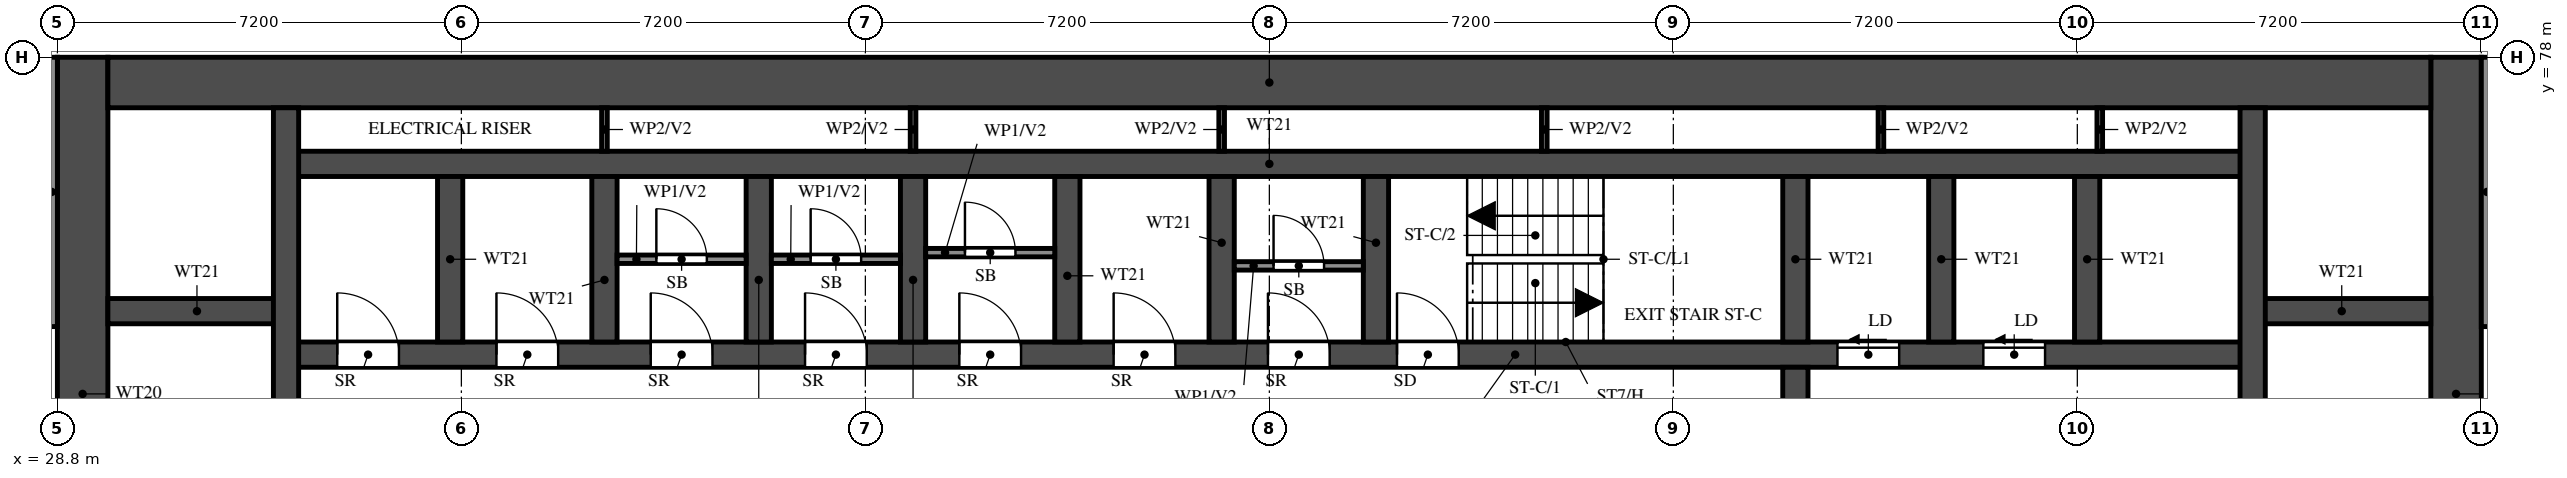
"""IFC4 building model, lengths in metres.
Left out: names, types, materials, properties, quantities, classifications, styles, units other than length and angle.
Written with IfcOpenShell. Run it as: python <this file> out.ifc"""

import sys

from ifc_helpers import new_model, si_unit, direction, frame, frame_2d, origin, place, context, subcontext, project, spatial, rectangle, extrude, element, fill, save


model = new_model("IFC4")
c1 = context("Model", 3, precision=1e-05, world=origin(), true_north=direction((0.0, 1.0)))
c2 = subcontext(c1, "Body", "Model", "MODEL_VIEW")
j1 = project(units=[si_unit("LENGTHUNIT", "METRE"), si_unit("PLANEANGLEUNIT", "RADIAN")], contexts=[c1])
p1 = place(None, origin())
s1 = spatial("IfcSite", under=j1, at=p1, CompositionType="ELEMENT")
p2 = place(p1, origin())
s2 = spatial("IfcBuilding", under=s1, at=p2, CompositionType="ELEMENT")
p3 = place(p2, frame((0.0, 0.0, 100.5)))
s3 = spatial("IfcBuildingStorey", under=s2, at=p3, CompositionType="ELEMENT", Elevation=100.5)
for number, where, z_axis, x_axis in (
    (1, (29.25, 66.0, 0.0), (0.0, 0.0, 1.0), (0.0, 1.0, 0.0)),
    (2, (71.55, 66.0, 0.0), (0.0, 0.0, 1.0), (0.0, 1.0, 0.0)),
):
    element("IfcWall", number, at=place(p3, frame(where, z_axis=z_axis, x_axis=x_axis)), inside=s3, PredefinedType="SHEAR", context=c2, shape_type="SweptSolid", body=[
        extrude(rectangle(XDim=12.0, YDim=0.9, at=frame_2d((6.0, 0.0))), origin(), (0.0, 0.0, 1.0), 3.18),
    ])
p4 = place(p3, frame((29.7, 77.55, 0.0), z_axis=(0.0, 0.0, 1.0), x_axis=(1.0, 0.0, 0.0)))
e3 = element("IfcWall", 3, at=p4, inside=s3, PredefinedType="SHEAR", context=c2, shape_type="SweptSolid", body=[
    extrude(rectangle(XDim=41.4, YDim=0.9, at=frame_2d((20.7, 0.0))), origin(), (0.0, 0.0, 1.0), 3.18),
])
p5 = place(p3, frame((32.875, 72.7, 0.0), z_axis=(0.0, 0.0, 1.0), x_axis=(1.0, 0.0, 0.0)))
e4 = element("IfcWall", 4, at=p5, inside=s3, PredefinedType="SHEAR", context=c2, shape_type="SweptSolid", body=[
    extrude(rectangle(XDim=35.05, YDim=0.45, at=frame_2d((17.525, 0.0))), origin(), (0.0, 0.0, 1.0), 3.18),
])
p6 = place(p5, frame((19.8, 0.0, 0.0)))
e5 = element("IfcOpeningElement", 5, at=p6, cuts=e4, PredefinedType="OPENING", context=c2, shape_type="SweptSolid", body=[
    extrude(rectangle(XDim=1.1, YDim=2.1, at=frame_2d((0.55, 1.05))), frame((0.0, 0.235, 0.0), z_axis=(0.0, -1.0, 0.0), x_axis=(1.0, 0.0, 0.0)), (0.0, 0.0, 1.0), 0.47),
])
p7 = place(p5, frame((27.65, 0.0, 0.0)))
e6 = element("IfcOpeningElement", 6, at=p7, cuts=e4, PredefinedType="OPENING", context=c2, shape_type="SweptSolid", body=[
    extrude(rectangle(XDim=1.1, YDim=2.1, at=frame_2d((0.55, 1.05))), frame((0.0, 0.235, 0.0), z_axis=(0.0, -1.0, 0.0), x_axis=(1.0, 0.0, 0.0)), (0.0, 0.0, 1.0), 0.47),
])
p8 = place(p5, frame((30.25, 0.0, 0.0)))
e7 = element("IfcOpeningElement", 7, at=p8, cuts=e4, PredefinedType="OPENING", context=c2, shape_type="SweptSolid", body=[
    extrude(rectangle(XDim=1.1, YDim=2.1, at=frame_2d((0.55, 1.05))), frame((0.0, 0.235, 0.0), z_axis=(0.0, -1.0, 0.0), x_axis=(1.0, 0.0, 0.0)), (0.0, 0.0, 1.0), 0.47),
])
p9 = place(p5, frame((3.75, 0.0, 0.0)))
e8 = element("IfcOpeningElement", 8, at=p9, cuts=e4, PredefinedType="OPENING", context=c2, shape_type="SweptSolid", body=[
    extrude(rectangle(XDim=1.1, YDim=2.1, at=frame_2d((0.55, 1.05))), frame((0.0, 0.235, 0.0), z_axis=(0.0, -1.0, 0.0), x_axis=(1.0, 0.0, 0.0)), (0.0, 0.0, 1.0), 0.47),
])
p10 = place(p5, frame((6.5, 0.0, 0.0)))
e9 = element("IfcOpeningElement", 9, at=p10, cuts=e4, PredefinedType="OPENING", context=c2, shape_type="SweptSolid", body=[
    extrude(rectangle(XDim=1.1, YDim=2.1, at=frame_2d((0.55, 1.05))), frame((0.0, 0.235, 0.0), z_axis=(0.0, -1.0, 0.0), x_axis=(1.0, 0.0, 0.0)), (0.0, 0.0, 1.0), 0.47),
])
p11 = place(p5, frame((9.25, 0.0, 0.0)))
e10 = element("IfcOpeningElement", 10, at=p11, cuts=e4, PredefinedType="OPENING", context=c2, shape_type="SweptSolid", body=[
    extrude(rectangle(XDim=1.1, YDim=2.1, at=frame_2d((0.55, 1.05))), frame((0.0, 0.235, 0.0), z_axis=(0.0, -1.0, 0.0), x_axis=(1.0, 0.0, 0.0)), (0.0, 0.0, 1.0), 0.47),
])
p12 = place(p5, frame((12.0, 0.0, 0.0)))
e11 = element("IfcOpeningElement", 11, at=p12, cuts=e4, PredefinedType="OPENING", context=c2, shape_type="SweptSolid", body=[
    extrude(rectangle(XDim=1.1, YDim=2.1, at=frame_2d((0.55, 1.05))), frame((0.0, 0.235, 0.0), z_axis=(0.0, -1.0, 0.0), x_axis=(1.0, 0.0, 0.0)), (0.0, 0.0, 1.0), 0.47),
])
p13 = place(p5, frame((14.75, 0.0, 0.0)))
e12 = element("IfcOpeningElement", 12, at=p13, cuts=e4, PredefinedType="OPENING", context=c2, shape_type="SweptSolid", body=[
    extrude(rectangle(XDim=1.1, YDim=2.1, at=frame_2d((0.55, 1.05))), frame((0.0, 0.235, 0.0), z_axis=(0.0, -1.0, 0.0), x_axis=(1.0, 0.0, 0.0)), (0.0, 0.0, 1.0), 0.47),
])
p14 = place(p5, frame((17.5, 0.0, 0.0)))
e13 = element("IfcOpeningElement", 13, at=p14, cuts=e4, PredefinedType="OPENING", context=c2, shape_type="SweptSolid", body=[
    extrude(rectangle(XDim=1.1, YDim=2.1, at=frame_2d((0.55, 1.05))), frame((0.0, 0.235, 0.0), z_axis=(0.0, -1.0, 0.0), x_axis=(1.0, 0.0, 0.0)), (0.0, 0.0, 1.0), 0.47),
])
p15 = place(p5, frame((0.913, 0.0, 0.0)))
e14 = element("IfcOpeningElement", 14, at=p15, cuts=e4, PredefinedType="OPENING", context=c2, shape_type="SweptSolid", body=[
    extrude(rectangle(XDim=1.1, YDim=2.1, at=frame_2d((0.55, 1.05))), frame((0.0, 0.235, 0.0), z_axis=(0.0, -1.0, 0.0), x_axis=(1.0, 0.0, 0.0)), (0.0, 0.0, 1.0), 0.47),
])
p16 = place(p3, frame((32.875, 76.1, 0.0), z_axis=(0.0, 0.0, 1.0), x_axis=(1.0, 0.0, 0.0)))
e15 = element("IfcWall", 15, at=p16, inside=s3, PredefinedType="SHEAR", context=c2, shape_type="SweptSolid", body=[
    extrude(rectangle(XDim=35.05, YDim=0.45, at=frame_2d((17.525, 0.0))), origin(), (0.0, 0.0, 1.0), 3.18),
])
for number, where, z_axis, x_axis in (
    (16, (29.7, 73.475, 0.0), (0.0, 0.0, 1.0), (1.0, 0.0, 0.0)),
    (17, (67.925, 73.475, 0.0), (0.0, 0.0, 1.0), (1.0, 0.0, 0.0)),
):
    element("IfcWall", number, at=place(p3, frame(where, z_axis=z_axis, x_axis=x_axis)), inside=s3, PredefinedType="SHEAR", context=c2, shape_type="SweptSolid", body=[
        extrude(rectangle(XDim=3.175, YDim=0.45, at=frame_2d((1.587, 0.0))), origin(), (0.0, 0.0, 1.0), 3.18),
    ])
p17 = place(p3, frame((32.875, 66.45, 0.0), z_axis=(0.0, 0.0, 1.0), x_axis=(0.0, 1.0, 0.0)))
e18 = element("IfcWall", 18, at=p17, inside=s3, PredefinedType="SHEAR", context=c2, shape_type="SweptSolid", body=[
    extrude(rectangle(XDim=10.65, YDim=0.45, at=frame_2d((5.325, 0.0))), origin(), (0.0, 0.0, 1.0), 3.18),
])
p18 = place(p3, frame((67.925, 66.45, 0.0), z_axis=(0.0, 0.0, 1.0), x_axis=(0.0, 1.0, 0.0)))
e19 = element("IfcWall", 19, at=p18, inside=s3, PredefinedType="SHEAR", context=c2, shape_type="SweptSolid", body=[
    extrude(rectangle(XDim=10.65, YDim=0.45, at=frame_2d((5.325, 0.0))), origin(), (0.0, 0.0, 1.0), 3.18),
])
p19 = place(p18, frame((0.15, 0.0, 0.0)))
e20 = element("IfcOpeningElement", 20, at=p19, cuts=e19, PredefinedType="OPENING", context=c2, shape_type="SweptSolid", body=[
    extrude(rectangle(XDim=1.1, YDim=2.1, at=frame_2d((0.55, 1.05))), frame((0.0, 0.235, 0.0), z_axis=(0.0, -1.0, 0.0), x_axis=(1.0, 0.0, 0.0)), (0.0, 0.0, 1.0), 0.47),
])
p20 = place(p3, frame((59.775, 66.45, 0.0), z_axis=(0.0, 0.0, 1.0), x_axis=(0.0, 1.0, 0.0)))
e21 = element("IfcWall", 21, at=p20, inside=s3, PredefinedType="SHEAR", context=c2, shape_type="SweptSolid", body=[
    extrude(rectangle(XDim=6.025, YDim=0.45, at=frame_2d((3.013, 0.0))), origin(), (0.0, 0.0, 1.0), 3.18),
])
p21 = place(p20, frame((3.85, 0.0, 0.0)))
e22 = element("IfcOpeningElement", 22, at=p21, cuts=e21, PredefinedType="OPENING", context=c2, shape_type="SweptSolid", body=[
    extrude(rectangle(XDim=1.2, YDim=2.1, at=frame_2d((0.6, 1.05))), frame((0.0, 0.235, 0.0), z_axis=(0.0, -1.0, 0.0), x_axis=(1.0, 0.0, 0.0)), (0.0, 0.0, 1.0), 0.47),
])
for number, where, z_axis, x_axis in (
    (23, (59.775, 72.925, 0.0), (0.0, 0.0, 1.0), (0.0, 1.0, 0.0)),
    (24, (35.8, 72.925, 0.0), (0.0, 0.0, 1.0), (0.0, 1.0, 0.0)),
    (25, (38.55, 72.925, 0.0), (0.0, 0.0, 1.0), (0.0, 1.0, 0.0)),
    (26, (41.3, 72.925, 0.0), (0.0, 0.0, 1.0), (0.0, 1.0, 0.0)),
    (27, (44.05, 72.925, 0.0), (0.0, 0.0, 1.0), (0.0, 1.0, 0.0)),
    (28, (46.8, 72.925, 0.0), (0.0, 0.0, 1.0), (0.0, 1.0, 0.0)),
    (29, (49.55, 72.925, 0.0), (0.0, 0.0, 1.0), (0.0, 1.0, 0.0)),
    (30, (52.3, 72.925, 0.0), (0.0, 0.0, 1.0), (0.0, 1.0, 0.0)),
    (31, (62.375, 72.925, 0.0), (0.0, 0.0, 1.0), (0.0, 1.0, 0.0)),
    (32, (64.975, 72.925, 0.0), (0.0, 0.0, 1.0), (0.0, 1.0, 0.0)),
):
    element("IfcWall", number, at=place(p3, frame(where, z_axis=z_axis, x_axis=x_axis)), inside=s3, PredefinedType="SHEAR", context=c2, shape_type="SweptSolid", body=[
        extrude(rectangle(XDim=2.95, YDim=0.45, at=frame_2d((1.475, 0.0))), origin(), (0.0, 0.0, 1.0), 3.18),
    ])
p22 = place(p3, frame((38.775, 74.4, 0.0), z_axis=(0.0, 0.0, 1.0), x_axis=(1.0, 0.0, 0.0)))
e33 = element("IfcWall", 33, at=p22, inside=s3, PredefinedType="PARTITIONING", context=c2, shape_type="SweptSolid", body=[
    extrude(rectangle(XDim=2.3, YDim=0.15, at=frame_2d((1.15, 0.0))), origin(), (0.0, 0.0, 1.0), 3.18),
])
p23 = place(p22, frame((0.7, 0.0, 0.0)))
e34 = element("IfcOpeningElement", 34, at=p23, cuts=e33, PredefinedType="OPENING", context=c2, shape_type="SweptSolid", body=[
    extrude(rectangle(XDim=0.9, YDim=2.1, at=frame_2d((0.45, 1.05))), frame((0.0, 0.085, 0.0), z_axis=(0.0, -1.0, 0.0), x_axis=(1.0, 0.0, 0.0)), (0.0, 0.0, 1.0), 0.17),
])
p24 = place(p3, frame((41.525, 74.4, 0.0), z_axis=(0.0, 0.0, 1.0), x_axis=(1.0, 0.0, 0.0)))
e35 = element("IfcWall", 35, at=p24, inside=s3, PredefinedType="PARTITIONING", context=c2, shape_type="SweptSolid", body=[
    extrude(rectangle(XDim=2.3, YDim=0.15, at=frame_2d((1.15, 0.0))), origin(), (0.0, 0.0, 1.0), 3.18),
])
p25 = place(p24, frame((0.7, 0.0, 0.0)))
e36 = element("IfcOpeningElement", 36, at=p25, cuts=e35, PredefinedType="OPENING", context=c2, shape_type="SweptSolid", body=[
    extrude(rectangle(XDim=0.9, YDim=2.1, at=frame_2d((0.45, 1.05))), frame((0.0, 0.085, 0.0), z_axis=(0.0, -1.0, 0.0), x_axis=(1.0, 0.0, 0.0)), (0.0, 0.0, 1.0), 0.17),
])
p26 = place(p3, frame((44.275, 74.518, 0.0), z_axis=(0.0, 0.0, 1.0), x_axis=(1.0, 0.0, 0.0)))
e37 = element("IfcWall", 37, at=p26, inside=s3, PredefinedType="PARTITIONING", context=c2, shape_type="SweptSolid", body=[
    extrude(rectangle(XDim=2.3, YDim=0.15, at=frame_2d((1.15, 0.0))), origin(), (0.0, 0.0, 1.0), 3.18),
])
p27 = place(p26, frame((0.7, 0.0, 0.0)))
e38 = element("IfcOpeningElement", 38, at=p27, cuts=e37, PredefinedType="OPENING", context=c2, shape_type="SweptSolid", body=[
    extrude(rectangle(XDim=0.9, YDim=2.1, at=frame_2d((0.45, 1.05))), frame((0.0, 0.085, 0.0), z_axis=(0.0, -1.0, 0.0), x_axis=(1.0, 0.0, 0.0)), (0.0, 0.0, 1.0), 0.17),
])
p28 = place(p3, frame((49.775, 74.282, 0.0), z_axis=(0.0, 0.0, 1.0), x_axis=(1.0, 0.0, 0.0)))
e39 = element("IfcWall", 39, at=p28, inside=s3, PredefinedType="PARTITIONING", context=c2, shape_type="SweptSolid", body=[
    extrude(rectangle(XDim=2.3, YDim=0.15, at=frame_2d((1.15, 0.0))), origin(), (0.0, 0.0, 1.0), 3.18),
])
p29 = place(p28, frame((0.7, 0.0, 0.0)))
e40 = element("IfcOpeningElement", 40, at=p29, cuts=e39, PredefinedType="OPENING", context=c2, shape_type="SweptSolid", body=[
    extrude(rectangle(XDim=0.9, YDim=2.1, at=frame_2d((0.45, 1.05))), frame((0.0, 0.085, 0.0), z_axis=(0.0, -1.0, 0.0), x_axis=(1.0, 0.0, 0.0)), (0.0, 0.0, 1.0), 0.17),
])
for number, where, z_axis, x_axis in (
    (41, (38.55, 76.325, 0.0), (0.0, 0.0, 1.0), (0.0, 1.0, 0.0)),
    (42, (44.05, 76.325, 0.0), (0.0, 0.0, 1.0), (0.0, 1.0, 0.0)),
    (43, (49.55, 76.325, 0.0), (0.0, 0.0, 1.0), (0.0, 1.0, 0.0)),
    (44, (55.3, 76.325, 0.0), (0.0, 0.0, 1.0), (0.0, 1.0, 0.0)),
    (45, (61.3, 76.325, 0.0), (0.0, 0.0, 1.0), (0.0, 1.0, 0.0)),
    (46, (65.2, 76.325, 0.0), (0.0, 0.0, 1.0), (0.0, 1.0, 0.0)),
):
    element("IfcWall", number, at=place(p3, frame(where, z_axis=z_axis, x_axis=x_axis)), inside=s3, PredefinedType="PARTITIONING", context=c2, shape_type="SweptSolid", body=[
        extrude(rectangle(XDim=0.775, YDim=0.1, at=frame_2d((0.388, 0.0))), origin(), (0.0, 0.0, 1.0), 3.18),
    ])
for number, where, z_axis, x_axis in (
    (47, (28.7, 73.2, 0.0), (0.0, 0.0, 1.0), (0.0, 1.0, 0.0)),
    (48, (72.1, 73.2, 0.0), (0.0, 0.0, 1.0), (0.0, 1.0, 0.0)),
):
    element("IfcWall", number, at=place(p3, frame(where, z_axis=z_axis, x_axis=x_axis)), inside=s3, PredefinedType="SOLIDWALL", context=c2, shape_type="SweptSolid", body=[
        extrude(rectangle(XDim=4.8, YDim=0.2, at=frame_2d((2.4, 0.0))), origin(), (0.0, 0.0, 1.0), 3.18),
    ])
p30 = place(p6, origin())
e49 = element("IfcDoor", 49, at=p30, inside=s3, OperationType="SINGLE_SWING_LEFT", PredefinedType="DOOR", context=c2, shape_type="SweptSolid", body=[
    extrude(rectangle(XDim=1.1, YDim=2.1, at=frame_2d((0.55, 1.05))), frame((0.0, 0.025, 0.0), z_axis=(0.0, -1.0, 0.0), x_axis=(1.0, 0.0, 0.0)), (0.0, 0.0, 1.0), 0.05),
])
fill(e5, e49)
p31 = place(p7, origin())
e50 = element("IfcDoor", 50, at=p31, inside=s3, OperationType="SLIDING_TO_LEFT", PredefinedType="DOOR", context=c2, shape_type="SweptSolid", body=[
    extrude(rectangle(XDim=1.1, YDim=2.1, at=frame_2d((0.55, 1.05))), frame((0.0, 0.025, 0.0), z_axis=(0.0, -1.0, 0.0), x_axis=(1.0, 0.0, 0.0)), (0.0, 0.0, 1.0), 0.05),
])
fill(e6, e50)
p32 = place(p8, origin())
e51 = element("IfcDoor", 51, at=p32, inside=s3, OperationType="SLIDING_TO_LEFT", PredefinedType="DOOR", context=c2, shape_type="SweptSolid", body=[
    extrude(rectangle(XDim=1.1, YDim=2.1, at=frame_2d((0.55, 1.05))), frame((0.0, 0.025, 0.0), z_axis=(0.0, -1.0, 0.0), x_axis=(1.0, 0.0, 0.0)), (0.0, 0.0, 1.0), 0.05),
])
fill(e7, e51)
p33 = place(p9, origin())
e52 = element("IfcDoor", 52, at=p33, inside=s3, OperationType="SINGLE_SWING_LEFT", PredefinedType="DOOR", context=c2, shape_type="SweptSolid", body=[
    extrude(rectangle(XDim=1.1, YDim=2.1, at=frame_2d((0.55, 1.05))), frame((0.0, 0.025, 0.0), z_axis=(0.0, -1.0, 0.0), x_axis=(1.0, 0.0, 0.0)), (0.0, 0.0, 1.0), 0.05),
])
fill(e8, e52)
p34 = place(p10, origin())
e53 = element("IfcDoor", 53, at=p34, inside=s3, OperationType="SINGLE_SWING_LEFT", PredefinedType="DOOR", context=c2, shape_type="SweptSolid", body=[
    extrude(rectangle(XDim=1.1, YDim=2.1, at=frame_2d((0.55, 1.05))), frame((0.0, 0.025, 0.0), z_axis=(0.0, -1.0, 0.0), x_axis=(1.0, 0.0, 0.0)), (0.0, 0.0, 1.0), 0.05),
])
fill(e9, e53)
p35 = place(p23, origin())
e54 = element("IfcDoor", 54, at=p35, inside=s3, OperationType="SINGLE_SWING_RIGHT", PredefinedType="DOOR", context=c2, shape_type="SweptSolid", body=[
    extrude(rectangle(XDim=0.9, YDim=2.1, at=frame_2d((0.45, 1.05))), frame((0.0, 0.025, 0.0), z_axis=(0.0, -1.0, 0.0), x_axis=(1.0, 0.0, 0.0)), (0.0, 0.0, 1.0), 0.05),
])
fill(e34, e54)
p36 = place(p11, origin())
e55 = element("IfcDoor", 55, at=p36, inside=s3, OperationType="SINGLE_SWING_LEFT", PredefinedType="DOOR", context=c2, shape_type="SweptSolid", body=[
    extrude(rectangle(XDim=1.1, YDim=2.1, at=frame_2d((0.55, 1.05))), frame((0.0, 0.025, 0.0), z_axis=(0.0, -1.0, 0.0), x_axis=(1.0, 0.0, 0.0)), (0.0, 0.0, 1.0), 0.05),
])
fill(e10, e55)
p37 = place(p25, origin())
e56 = element("IfcDoor", 56, at=p37, inside=s3, OperationType="SINGLE_SWING_LEFT", PredefinedType="DOOR", context=c2, shape_type="SweptSolid", body=[
    extrude(rectangle(XDim=0.9, YDim=2.1, at=frame_2d((0.45, 1.05))), frame((0.0, 0.025, 0.0), z_axis=(0.0, -1.0, 0.0), x_axis=(1.0, 0.0, 0.0)), (0.0, 0.0, 1.0), 0.05),
])
fill(e36, e56)
p38 = place(p12, origin())
e57 = element("IfcDoor", 57, at=p38, inside=s3, OperationType="SINGLE_SWING_LEFT", PredefinedType="DOOR", context=c2, shape_type="SweptSolid", body=[
    extrude(rectangle(XDim=1.1, YDim=2.1, at=frame_2d((0.55, 1.05))), frame((0.0, 0.025, 0.0), z_axis=(0.0, -1.0, 0.0), x_axis=(1.0, 0.0, 0.0)), (0.0, 0.0, 1.0), 0.05),
])
fill(e11, e57)
p39 = place(p27, origin())
e58 = element("IfcDoor", 58, at=p39, inside=s3, OperationType="SINGLE_SWING_LEFT", PredefinedType="DOOR", context=c2, shape_type="SweptSolid", body=[
    extrude(rectangle(XDim=0.9, YDim=2.1, at=frame_2d((0.45, 1.05))), frame((0.0, 0.025, 0.0), z_axis=(0.0, -1.0, 0.0), x_axis=(1.0, 0.0, 0.0)), (0.0, 0.0, 1.0), 0.05),
])
fill(e38, e58)
p40 = place(p13, origin())
e59 = element("IfcDoor", 59, at=p40, inside=s3, OperationType="SINGLE_SWING_LEFT", PredefinedType="DOOR", context=c2, shape_type="SweptSolid", body=[
    extrude(rectangle(XDim=1.1, YDim=2.1, at=frame_2d((0.55, 1.05))), frame((0.0, 0.025, 0.0), z_axis=(0.0, -1.0, 0.0), x_axis=(1.0, 0.0, 0.0)), (0.0, 0.0, 1.0), 0.05),
])
fill(e12, e59)
p41 = place(p14, origin())
e60 = element("IfcDoor", 60, at=p41, inside=s3, OperationType="SINGLE_SWING_LEFT", PredefinedType="DOOR", context=c2, shape_type="SweptSolid", body=[
    extrude(rectangle(XDim=1.1, YDim=2.1, at=frame_2d((0.55, 1.05))), frame((0.0, 0.025, 0.0), z_axis=(0.0, -1.0, 0.0), x_axis=(1.0, 0.0, 0.0)), (0.0, 0.0, 1.0), 0.05),
])
fill(e13, e60)
p42 = place(p29, origin())
e61 = element("IfcDoor", 61, at=p42, inside=s3, OperationType="SINGLE_SWING_RIGHT", PredefinedType="DOOR", context=c2, shape_type="SweptSolid", body=[
    extrude(rectangle(XDim=0.9, YDim=2.1, at=frame_2d((0.45, 1.05))), frame((0.0, 0.025, 0.0), z_axis=(0.0, -1.0, 0.0), x_axis=(1.0, 0.0, 0.0)), (0.0, 0.0, 1.0), 0.05),
])
fill(e40, e61)
p43 = place(p15, origin())
e62 = element("IfcDoor", 62, at=p43, inside=s3, OperationType="SINGLE_SWING_LEFT", PredefinedType="DOOR", context=c2, shape_type="SweptSolid", body=[
    extrude(rectangle(XDim=1.1, YDim=2.1, at=frame_2d((0.55, 1.05))), frame((0.0, 0.025, 0.0), z_axis=(0.0, -1.0, 0.0), x_axis=(1.0, 0.0, 0.0)), (0.0, 0.0, 1.0), 0.05),
])
fill(e14, e62)
save(model, sys.argv[1])
